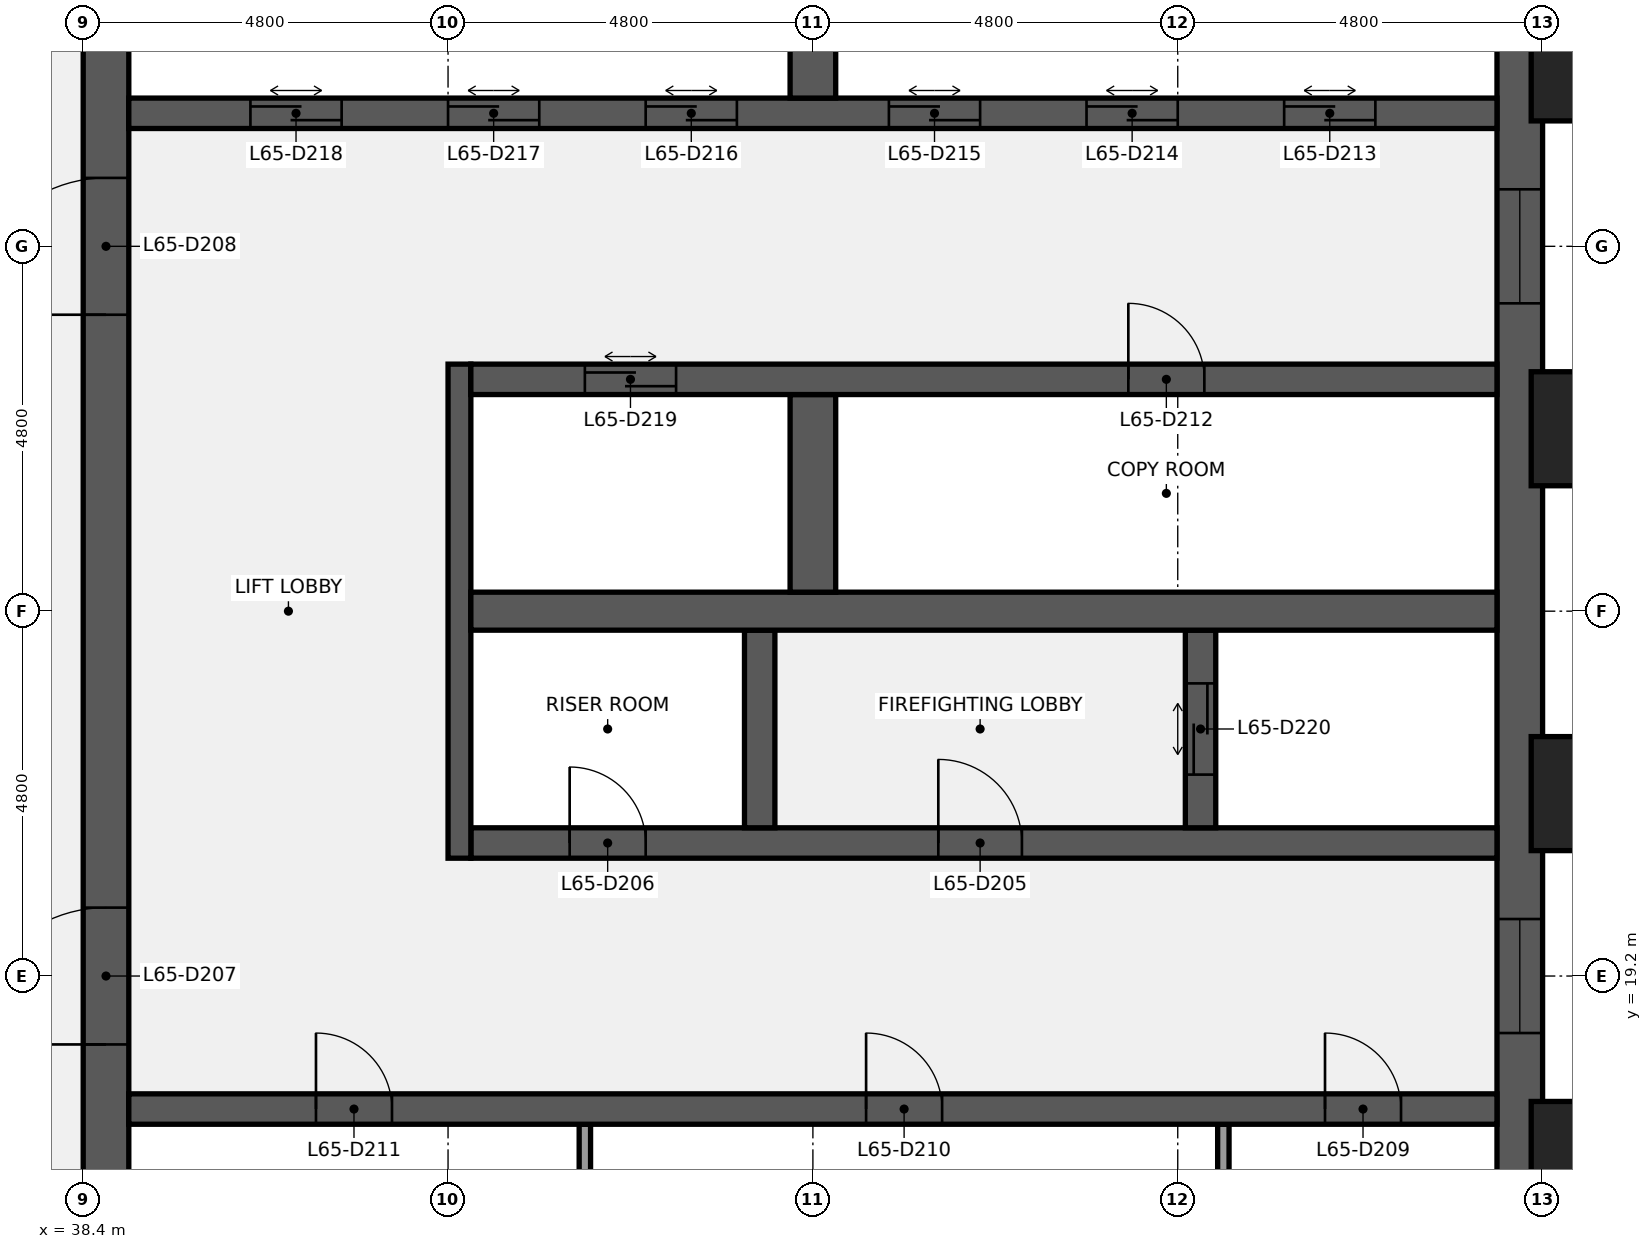
"""IFC4 building model, lengths in metres.
Left out: names, types, materials, properties, quantities, classifications, styles, units other than length and angle.
Written with IfcOpenShell. Run it as: python <this file> out.ifc"""

import sys

from ifc_helpers import new_model, si_unit, direction, frame, frame_2d, origin, origin_2d, place, context, subcontext, project, spatial, rectangle, extrude, element, fill, save


model = new_model("IFC4")
c1 = context("Model", 3, precision=1e-05, world=origin(), true_north=direction((0.0, 1.0)))
c2 = subcontext(c1, "Body", "Model", "MODEL_VIEW")
j1 = project(units=[si_unit("LENGTHUNIT", "METRE"), si_unit("PLANEANGLEUNIT", "RADIAN")], contexts=[c1])
p1 = place(None, origin())
s1 = spatial("IfcSite", under=j1, at=p1, CompositionType="ELEMENT")
p2 = place(p1, origin())
s2 = spatial("IfcBuilding", under=s1, at=p2, CompositionType="ELEMENT")
p3 = place(p2, frame((0.0, 0.0, 298.3)))
s3 = spatial("IfcBuildingStorey", under=s2, at=p3, CompositionType="ELEMENT", Elevation=298.3)
p4 = place(p3, frame((57.3, 38.4, 0.0), z_axis=(0.0, 0.0, 1.0), x_axis=(0.0, -1.0, 0.0)))
e1 = element("IfcWall", 1, at=p4, inside=s3, PredefinedType="SHEAR", context=c2, shape_type="SweptSolid", body=[
    extrude(rectangle(XDim=28.8, YDim=0.6, at=frame_2d((14.4, 0.0))), origin(), (0.0, 0.0, 1.0), 3.84),
])
p5 = place(p4, frame((18.45, 0.0, 0.9)))
e2 = element("IfcOpeningElement", 2, at=p5, cuts=e1, PredefinedType="OPENING", context=c2, shape_type="SweptSolid", body=[
    extrude(rectangle(XDim=1.5, YDim=1.5, at=frame_2d((0.75, 0.75))), frame((0.0, 0.31, 0.0), z_axis=(0.0, -1.0, 0.0), x_axis=(1.0, 0.0, 0.0)), (0.0, 0.0, 1.0), 0.62),
])
p6 = place(p4, frame((8.85, 0.0, 0.9)))
e3 = element("IfcOpeningElement", 3, at=p6, cuts=e1, PredefinedType="OPENING", context=c2, shape_type="SweptSolid", body=[
    extrude(rectangle(XDim=1.5, YDim=1.5, at=frame_2d((0.75, 0.75))), frame((0.0, 0.31, 0.0), z_axis=(0.0, -1.0, 0.0), x_axis=(1.0, 0.0, 0.0)), (0.0, 0.0, 1.0), 0.62),
])
p7 = place(p3, frame((38.7, 9.6, 0.0), z_axis=(0.0, 0.0, 1.0), x_axis=(0.0, 1.0, 0.0)))
e4 = element("IfcWall", 4, at=p7, inside=s3, PredefinedType="SHEAR", context=c2, shape_type="SweptSolid", body=[
    extrude(rectangle(XDim=28.8, YDim=0.6, at=frame_2d((14.4, 0.0))), origin(), (0.0, 0.0, 1.0), 3.84),
])
p8 = place(p7, frame((8.7, 0.0, 0.0)))
e5 = element("IfcOpeningElement", 5, at=p8, cuts=e4, PredefinedType="OPENING", context=c2, shape_type="SweptSolid", body=[
    extrude(rectangle(XDim=1.8, YDim=2.1, at=frame_2d((0.9, 1.05))), frame((0.0, 0.31, 0.0), z_axis=(0.0, -1.0, 0.0), x_axis=(1.0, 0.0, 0.0)), (0.0, 0.0, 1.0), 0.62),
])
p9 = place(p7, frame((18.3, 0.0, 0.0)))
e6 = element("IfcOpeningElement", 6, at=p9, cuts=e4, PredefinedType="OPENING", context=c2, shape_type="SweptSolid", body=[
    extrude(rectangle(XDim=1.8, YDim=2.1, at=frame_2d((0.9, 1.05))), frame((0.0, 0.31, 0.0), z_axis=(0.0, -1.0, 0.0), x_axis=(1.0, 0.0, 0.0)), (0.0, 0.0, 1.0), 0.62),
])
for number, where, z_axis, x_axis in (
    (7, (53.4, 14.65, 0.0), (0.0, 0.0, 1.0), (0.0, 1.0, 0.0)),
    (8, (45.0, 14.65, 0.0), (0.0, 0.0, 1.0), (0.0, 1.0, 0.0)),
):
    element("IfcWall", number, at=place(p3, frame(where, z_axis=z_axis, x_axis=x_axis)), inside=s3, PredefinedType="PARTITIONING", context=c2, shape_type="SweptSolid", body=[
        extrude(rectangle(XDim=2.6, YDim=0.15, at=frame_2d((1.3, 0.0))), origin(), (0.0, 0.0, 1.0), 3.84),
    ])
p10 = place(p3, frame((39.0, 17.45, 0.0), z_axis=(0.0, 0.0, 1.0), x_axis=(1.0, 0.0, 0.0)))
e9 = element("IfcWall", 9, at=p10, inside=s3, PredefinedType="SHEAR", context=c2, shape_type="SweptSolid", body=[
    extrude(rectangle(XDim=18.0, YDim=0.4, at=frame_2d((9.0, 0.0))), origin(), (0.0, 0.0, 1.0), 3.84),
])
p11 = place(p10, frame((15.738, 0.0, 0.0)))
e10 = element("IfcOpeningElement", 10, at=p11, cuts=e9, PredefinedType="OPENING", context=c2, shape_type="SweptSolid", body=[
    extrude(rectangle(XDim=1.0, YDim=2.1, at=frame_2d((0.5, 1.05))), frame((0.0, 0.21, 0.0), z_axis=(0.0, -1.0, 0.0), x_axis=(1.0, 0.0, 0.0)), (0.0, 0.0, 1.0), 0.42),
])
p12 = place(p10, frame((9.7, 0.0, 0.0)))
e11 = element("IfcOpeningElement", 11, at=p12, cuts=e9, PredefinedType="OPENING", context=c2, shape_type="SweptSolid", body=[
    extrude(rectangle(XDim=1.0, YDim=2.1, at=frame_2d((0.5, 1.05))), frame((0.0, 0.21, 0.0), z_axis=(0.0, -1.0, 0.0), x_axis=(1.0, 0.0, 0.0)), (0.0, 0.0, 1.0), 0.42),
])
p13 = place(p10, frame((2.462, 0.0, 0.0)))
e12 = element("IfcOpeningElement", 12, at=p13, cuts=e9, PredefinedType="OPENING", context=c2, shape_type="SweptSolid", body=[
    extrude(rectangle(XDim=1.0, YDim=2.1, at=frame_2d((0.5, 1.05))), frame((0.0, 0.21, 0.0), z_axis=(0.0, -1.0, 0.0), x_axis=(1.0, 0.0, 0.0)), (0.0, 0.0, 1.0), 0.42),
])
p14 = place(p3, frame((43.5, 20.95, 0.0), z_axis=(0.0, 0.0, 1.0), x_axis=(1.0, 0.0, 0.0)))
e13 = element("IfcWall", 13, at=p14, inside=s3, PredefinedType="SHEAR", context=c2, shape_type="SweptSolid", body=[
    extrude(rectangle(XDim=13.5, YDim=0.4, at=frame_2d((6.75, 0.0))), origin(), (0.0, 0.0, 1.0), 3.84),
])
p15 = place(p14, frame((6.15, 0.0, 0.0)))
e14 = element("IfcOpeningElement", 14, at=p15, cuts=e13, PredefinedType="OPENING", context=c2, shape_type="SweptSolid", body=[
    extrude(rectangle(XDim=1.1, YDim=2.1, at=frame_2d((0.55, 1.05))), frame((0.0, 0.21, 0.0), z_axis=(0.0, -1.0, 0.0), x_axis=(1.0, 0.0, 0.0)), (0.0, 0.0, 1.0), 0.42),
])
p16 = place(p14, frame((1.3, 0.0, 0.0)))
e15 = element("IfcOpeningElement", 15, at=p16, cuts=e13, PredefinedType="OPENING", context=c2, shape_type="SweptSolid", body=[
    extrude(rectangle(XDim=1.0, YDim=2.1, at=frame_2d((0.5, 1.05))), frame((0.0, 0.21, 0.0), z_axis=(0.0, -1.0, 0.0), x_axis=(1.0, 0.0, 0.0)), (0.0, 0.0, 1.0), 0.42),
])
p17 = place(p3, frame((43.35, 20.75, 0.0), z_axis=(0.0, 0.0, 1.0), x_axis=(0.0, 1.0, 0.0)))
e16 = element("IfcWall", 16, at=p17, inside=s3, PredefinedType="SHEAR", context=c2, shape_type="SweptSolid", body=[
    extrude(rectangle(XDim=6.5, YDim=0.3, at=frame_2d((3.25, 0.0))), origin(), (0.0, 0.0, 1.0), 3.84),
])
p18 = place(p3, frame((53.1, 21.15, 0.0), z_axis=(0.0, 0.0, 1.0), x_axis=(0.0, 1.0, 0.0)))
e17 = element("IfcWall", 17, at=p18, inside=s3, PredefinedType="SHEAR", context=c2, shape_type="SweptSolid", body=[
    extrude(rectangle(XDim=2.6, YDim=0.4, at=frame_2d((1.3, 0.0))), origin(), (0.0, 0.0, 1.0), 3.84),
])
p19 = place(p18, frame((0.7, 0.0, 0.0)))
e18 = element("IfcOpeningElement", 18, at=p19, cuts=e17, PredefinedType="OPENING", context=c2, shape_type="SweptSolid", body=[
    extrude(rectangle(XDim=1.2, YDim=2.1, at=frame_2d((0.6, 1.05))), frame((0.0, 0.21, 0.0), z_axis=(0.0, -1.0, 0.0), x_axis=(1.0, 0.0, 0.0)), (0.0, 0.0, 1.0), 0.42),
])
p20 = place(p3, frame((47.3, 21.15, 0.0), z_axis=(0.0, 0.0, 1.0), x_axis=(0.0, 1.0, 0.0)))
e19 = element("IfcWall", 19, at=p20, inside=s3, PredefinedType="SHEAR", context=c2, shape_type="SweptSolid", body=[
    extrude(rectangle(XDim=2.6, YDim=0.4, at=frame_2d((1.3, 0.0))), origin(), (0.0, 0.0, 1.0), 3.84),
])
p21 = place(p3, frame((43.5, 24.0, 0.0), z_axis=(0.0, 0.0, 1.0), x_axis=(1.0, 0.0, 0.0)))
e20 = element("IfcWall", 20, at=p21, inside=s3, PredefinedType="SHEAR", context=c2, shape_type="SweptSolid", body=[
    extrude(rectangle(XDim=13.5, YDim=0.5, at=frame_2d((6.75, 0.0))), origin(), (0.0, 0.0, 1.0), 3.84),
])
p22 = place(p3, frame((48.0, 24.25, 0.0), z_axis=(0.0, 0.0, 1.0), x_axis=(0.0, 1.0, 0.0)))
e21 = element("IfcWall", 21, at=p22, inside=s3, PredefinedType="SHEAR", context=c2, shape_type="SweptSolid", body=[
    extrude(rectangle(XDim=2.6, YDim=0.6, at=frame_2d((1.3, 0.0))), origin(), (0.0, 0.0, 1.0), 3.84),
])
p23 = place(p3, frame((43.5, 27.05, 0.0), z_axis=(0.0, 0.0, 1.0), x_axis=(1.0, 0.0, 0.0)))
e22 = element("IfcWall", 22, at=p23, inside=s3, PredefinedType="SHEAR", context=c2, shape_type="SweptSolid", body=[
    extrude(rectangle(XDim=13.5, YDim=0.4, at=frame_2d((6.75, 0.0))), origin(), (0.0, 0.0, 1.0), 3.84),
])
p24 = place(p23, frame((8.65, 0.0, 0.0)))
e23 = element("IfcOpeningElement", 23, at=p24, cuts=e22, PredefinedType="OPENING", context=c2, shape_type="SweptSolid", body=[
    extrude(rectangle(XDim=1.0, YDim=2.1, at=frame_2d((0.5, 1.05))), frame((0.0, 0.21, 0.0), z_axis=(0.0, -1.0, 0.0), x_axis=(1.0, 0.0, 0.0)), (0.0, 0.0, 1.0), 0.42),
])
p25 = place(p23, frame((1.5, 0.0, 0.0)))
e24 = element("IfcOpeningElement", 24, at=p25, cuts=e22, PredefinedType="OPENING", context=c2, shape_type="SweptSolid", body=[
    extrude(rectangle(XDim=1.2, YDim=2.1, at=frame_2d((0.6, 1.05))), frame((0.0, 0.21, 0.0), z_axis=(0.0, -1.0, 0.0), x_axis=(1.0, 0.0, 0.0)), (0.0, 0.0, 1.0), 0.42),
])
p26 = place(p3, frame((39.0, 30.55, 0.0), z_axis=(0.0, 0.0, 1.0), x_axis=(1.0, 0.0, 0.0)))
e25 = element("IfcWall", 25, at=p26, inside=s3, PredefinedType="SHEAR", context=c2, shape_type="SweptSolid", body=[
    extrude(rectangle(XDim=18.0, YDim=0.4, at=frame_2d((9.0, 0.0))), origin(), (0.0, 0.0, 1.0), 3.84),
])
p27 = place(p26, frame((15.2, 0.0, 0.0)))
e26 = element("IfcOpeningElement", 26, at=p27, cuts=e25, PredefinedType="OPENING", context=c2, shape_type="SweptSolid", body=[
    extrude(rectangle(XDim=1.2, YDim=2.1, at=frame_2d((0.6, 1.05))), frame((0.0, 0.21, 0.0), z_axis=(0.0, -1.0, 0.0), x_axis=(1.0, 0.0, 0.0)), (0.0, 0.0, 1.0), 0.42),
])
p28 = place(p26, frame((12.6, 0.0, 0.0)))
e27 = element("IfcOpeningElement", 27, at=p28, cuts=e25, PredefinedType="OPENING", context=c2, shape_type="SweptSolid", body=[
    extrude(rectangle(XDim=1.2, YDim=2.1, at=frame_2d((0.6, 1.05))), frame((0.0, 0.21, 0.0), z_axis=(0.0, -1.0, 0.0), x_axis=(1.0, 0.0, 0.0)), (0.0, 0.0, 1.0), 0.42),
])
p29 = place(p26, frame((10.0, 0.0, 0.0)))
e28 = element("IfcOpeningElement", 28, at=p29, cuts=e25, PredefinedType="OPENING", context=c2, shape_type="SweptSolid", body=[
    extrude(rectangle(XDim=1.2, YDim=2.1, at=frame_2d((0.6, 1.05))), frame((0.0, 0.21, 0.0), z_axis=(0.0, -1.0, 0.0), x_axis=(1.0, 0.0, 0.0)), (0.0, 0.0, 1.0), 0.42),
])
p30 = place(p26, frame((6.8, 0.0, 0.0)))
e29 = element("IfcOpeningElement", 29, at=p30, cuts=e25, PredefinedType="OPENING", context=c2, shape_type="SweptSolid", body=[
    extrude(rectangle(XDim=1.2, YDim=2.1, at=frame_2d((0.6, 1.05))), frame((0.0, 0.21, 0.0), z_axis=(0.0, -1.0, 0.0), x_axis=(1.0, 0.0, 0.0)), (0.0, 0.0, 1.0), 0.42),
])
p31 = place(p26, frame((4.2, 0.0, 0.0)))
e30 = element("IfcOpeningElement", 30, at=p31, cuts=e25, PredefinedType="OPENING", context=c2, shape_type="SweptSolid", body=[
    extrude(rectangle(XDim=1.2, YDim=2.1, at=frame_2d((0.6, 1.05))), frame((0.0, 0.21, 0.0), z_axis=(0.0, -1.0, 0.0), x_axis=(1.0, 0.0, 0.0)), (0.0, 0.0, 1.0), 0.42),
])
p32 = place(p26, frame((1.6, 0.0, 0.0)))
e31 = element("IfcOpeningElement", 31, at=p32, cuts=e25, PredefinedType="OPENING", context=c2, shape_type="SweptSolid", body=[
    extrude(rectangle(XDim=1.2, YDim=2.1, at=frame_2d((0.6, 1.05))), frame((0.0, 0.21, 0.0), z_axis=(0.0, -1.0, 0.0), x_axis=(1.0, 0.0, 0.0)), (0.0, 0.0, 1.0), 0.42),
])
p33 = place(p3, frame((48.0, 30.75, 0.0), z_axis=(0.0, 0.0, 1.0), x_axis=(0.0, 1.0, 0.0)))
e32 = element("IfcWall", 32, at=p33, inside=s3, PredefinedType="SHEAR", context=c2, shape_type="SweptSolid", body=[
    extrude(rectangle(XDim=2.6, YDim=0.6, at=frame_2d((1.3, 0.0))), origin(), (0.0, 0.0, 1.0), 3.84),
])
for number, where, z_axis, x_axis in (
    (33, (58.35, 16.8, 0.0), (0.0, 0.0, 1.0), (0.0, 1.0, 0.0)),
    (34, (58.35, 21.6, 0.0), (0.0, 0.0, 1.0), (0.0, 1.0, 0.0)),
    (35, (58.35, 26.4, 0.0), (0.0, 0.0, 1.0), (0.0, 1.0, 0.0)),
    (36, (58.35, 31.2, 0.0), (0.0, 0.0, 1.0), (0.0, 1.0, 0.0)),
):
    element("IfcColumn", number, at=place(p3, frame(where, z_axis=z_axis, x_axis=x_axis)), inside=s3, PredefinedType="PILASTER", context=c2, shape_type="SweptSolid", body=[
        extrude(rectangle(XDim=1.8, YDim=1.5, at=origin_2d()), origin(), (0.0, 0.0, 1.0), 4.0),
    ])
p34 = place(p15, origin())
e37 = element("IfcDoor", 37, at=p34, inside=s3, OperationType="SINGLE_SWING_LEFT", PredefinedType="DOOR", context=c2, shape_type="SweptSolid", body=[
    extrude(rectangle(XDim=1.1, YDim=2.1, at=frame_2d((0.55, 1.05))), frame((0.0, 0.025, 0.0), z_axis=(0.0, -1.0, 0.0), x_axis=(1.0, 0.0, 0.0)), (0.0, 0.0, 1.0), 0.05),
])
fill(e14, e37)
p35 = place(p16, origin())
e38 = element("IfcDoor", 38, at=p35, inside=s3, OperationType="SINGLE_SWING_LEFT", PredefinedType="DOOR", context=c2, shape_type="SweptSolid", body=[
    extrude(rectangle(XDim=1.0, YDim=2.1, at=frame_2d((0.5, 1.05))), frame((0.0, 0.025, 0.0), z_axis=(0.0, -1.0, 0.0), x_axis=(1.0, 0.0, 0.0)), (0.0, 0.0, 1.0), 0.05),
])
fill(e15, e38)
p36 = place(p8, origin())
e39 = element("IfcDoor", 39, at=p36, inside=s3, OperationType="DOUBLE_DOOR_SINGLE_SWING", PredefinedType="DOOR", context=c2, shape_type="SweptSolid", body=[
    extrude(rectangle(XDim=1.8, YDim=2.1, at=frame_2d((0.9, 1.05))), frame((0.0, 0.025, 0.0), z_axis=(0.0, -1.0, 0.0), x_axis=(1.0, 0.0, 0.0)), (0.0, 0.0, 1.0), 0.05),
])
fill(e5, e39)
p37 = place(p9, origin())
e40 = element("IfcDoor", 40, at=p37, inside=s3, OperationType="DOUBLE_DOOR_SINGLE_SWING", PredefinedType="DOOR", context=c2, shape_type="SweptSolid", body=[
    extrude(rectangle(XDim=1.8, YDim=2.1, at=frame_2d((0.9, 1.05))), frame((0.0, 0.025, 0.0), z_axis=(0.0, -1.0, 0.0), x_axis=(1.0, 0.0, 0.0)), (0.0, 0.0, 1.0), 0.05),
])
fill(e6, e40)
p38 = place(p11, origin())
e41 = element("IfcDoor", 41, at=p38, inside=s3, OperationType="SINGLE_SWING_LEFT", PredefinedType="DOOR", context=c2, shape_type="SweptSolid", body=[
    extrude(rectangle(XDim=1.0, YDim=2.1, at=frame_2d((0.5, 1.05))), frame((0.0, 0.025, 0.0), z_axis=(0.0, -1.0, 0.0), x_axis=(1.0, 0.0, 0.0)), (0.0, 0.0, 1.0), 0.05),
])
fill(e10, e41)
p39 = place(p12, origin())
e42 = element("IfcDoor", 42, at=p39, inside=s3, OperationType="SINGLE_SWING_LEFT", PredefinedType="DOOR", context=c2, shape_type="SweptSolid", body=[
    extrude(rectangle(XDim=1.0, YDim=2.1, at=frame_2d((0.5, 1.05))), frame((0.0, 0.025, 0.0), z_axis=(0.0, -1.0, 0.0), x_axis=(1.0, 0.0, 0.0)), (0.0, 0.0, 1.0), 0.05),
])
fill(e11, e42)
p40 = place(p13, origin())
e43 = element("IfcDoor", 43, at=p40, inside=s3, OperationType="SINGLE_SWING_LEFT", PredefinedType="DOOR", context=c2, shape_type="SweptSolid", body=[
    extrude(rectangle(XDim=1.0, YDim=2.1, at=frame_2d((0.5, 1.05))), frame((0.0, 0.025, 0.0), z_axis=(0.0, -1.0, 0.0), x_axis=(1.0, 0.0, 0.0)), (0.0, 0.0, 1.0), 0.05),
])
fill(e12, e43)
p41 = place(p24, origin())
e44 = element("IfcDoor", 44, at=p41, inside=s3, OperationType="SINGLE_SWING_LEFT", PredefinedType="DOOR", context=c2, shape_type="SweptSolid", body=[
    extrude(rectangle(XDim=1.0, YDim=2.1, at=frame_2d((0.5, 1.05))), frame((0.0, 0.025, 0.0), z_axis=(0.0, -1.0, 0.0), x_axis=(1.0, 0.0, 0.0)), (0.0, 0.0, 1.0), 0.05),
])
fill(e23, e44)
p42 = place(p27, origin())
e45 = element("IfcDoor", 45, at=p42, inside=s3, OperationType="DOUBLE_DOOR_SLIDING", PredefinedType="DOOR", context=c2, shape_type="SweptSolid", body=[
    extrude(rectangle(XDim=1.2, YDim=2.1, at=frame_2d((0.6, 1.05))), frame((0.0, 0.025, 0.0), z_axis=(0.0, -1.0, 0.0), x_axis=(1.0, 0.0, 0.0)), (0.0, 0.0, 1.0), 0.05),
])
fill(e26, e45)
p43 = place(p28, origin())
e46 = element("IfcDoor", 46, at=p43, inside=s3, OperationType="DOUBLE_DOOR_SLIDING", PredefinedType="DOOR", context=c2, shape_type="SweptSolid", body=[
    extrude(rectangle(XDim=1.2, YDim=2.1, at=frame_2d((0.6, 1.05))), frame((0.0, 0.025, 0.0), z_axis=(0.0, -1.0, 0.0), x_axis=(1.0, 0.0, 0.0)), (0.0, 0.0, 1.0), 0.05),
])
fill(e27, e46)
p44 = place(p29, origin())
e47 = element("IfcDoor", 47, at=p44, inside=s3, OperationType="DOUBLE_DOOR_SLIDING", PredefinedType="DOOR", context=c2, shape_type="SweptSolid", body=[
    extrude(rectangle(XDim=1.2, YDim=2.1, at=frame_2d((0.6, 1.05))), frame((0.0, 0.025, 0.0), z_axis=(0.0, -1.0, 0.0), x_axis=(1.0, 0.0, 0.0)), (0.0, 0.0, 1.0), 0.05),
])
fill(e28, e47)
p45 = place(p30, origin())
e48 = element("IfcDoor", 48, at=p45, inside=s3, OperationType="DOUBLE_DOOR_SLIDING", PredefinedType="DOOR", context=c2, shape_type="SweptSolid", body=[
    extrude(rectangle(XDim=1.2, YDim=2.1, at=frame_2d((0.6, 1.05))), frame((0.0, 0.025, 0.0), z_axis=(0.0, -1.0, 0.0), x_axis=(1.0, 0.0, 0.0)), (0.0, 0.0, 1.0), 0.05),
])
fill(e29, e48)
p46 = place(p31, origin())
e49 = element("IfcDoor", 49, at=p46, inside=s3, OperationType="DOUBLE_DOOR_SLIDING", PredefinedType="DOOR", context=c2, shape_type="SweptSolid", body=[
    extrude(rectangle(XDim=1.2, YDim=2.1, at=frame_2d((0.6, 1.05))), frame((0.0, 0.025, 0.0), z_axis=(0.0, -1.0, 0.0), x_axis=(1.0, 0.0, 0.0)), (0.0, 0.0, 1.0), 0.05),
])
fill(e30, e49)
p47 = place(p32, origin())
e50 = element("IfcDoor", 50, at=p47, inside=s3, OperationType="DOUBLE_DOOR_SLIDING", PredefinedType="DOOR", context=c2, shape_type="SweptSolid", body=[
    extrude(rectangle(XDim=1.2, YDim=2.1, at=frame_2d((0.6, 1.05))), frame((0.0, 0.025, 0.0), z_axis=(0.0, -1.0, 0.0), x_axis=(1.0, 0.0, 0.0)), (0.0, 0.0, 1.0), 0.05),
])
fill(e31, e50)
p48 = place(p25, origin())
e51 = element("IfcDoor", 51, at=p48, inside=s3, OperationType="DOUBLE_DOOR_SLIDING", PredefinedType="DOOR", context=c2, shape_type="SweptSolid", body=[
    extrude(rectangle(XDim=1.2, YDim=2.1, at=frame_2d((0.6, 1.05))), frame((0.0, 0.025, 0.0), z_axis=(0.0, -1.0, 0.0), x_axis=(1.0, 0.0, 0.0)), (0.0, 0.0, 1.0), 0.05),
])
fill(e24, e51)
p49 = place(p19, origin())
e52 = element("IfcDoor", 52, at=p49, inside=s3, OperationType="DOUBLE_DOOR_SLIDING", PredefinedType="DOOR", context=c2, shape_type="SweptSolid", body=[
    extrude(rectangle(XDim=1.2, YDim=2.1, at=frame_2d((0.6, 1.05))), frame((0.0, 0.025, 0.0), z_axis=(0.0, -1.0, 0.0), x_axis=(1.0, 0.0, 0.0)), (0.0, 0.0, 1.0), 0.05),
])
fill(e18, e52)
p50 = place(p5, origin())
e53 = element("IfcWindow", 53, at=p50, inside=s3, PartitioningType="SINGLE_PANEL", PredefinedType="WINDOW", context=c2, shape_type="SweptSolid", body=[
    extrude(rectangle(XDim=1.5, YDim=1.5, at=frame_2d((0.75, 0.75))), frame((0.0, 0.03, 0.0), z_axis=(0.0, -1.0, 0.0), x_axis=(1.0, 0.0, 0.0)), (0.0, 0.0, 1.0), 0.06),
])
fill(e2, e53)
p51 = place(p6, origin())
e54 = element("IfcWindow", 54, at=p51, inside=s3, PartitioningType="SINGLE_PANEL", PredefinedType="WINDOW", context=c2, shape_type="SweptSolid", body=[
    extrude(rectangle(XDim=1.5, YDim=1.5, at=frame_2d((0.75, 0.75))), frame((0.0, 0.03, 0.0), z_axis=(0.0, -1.0, 0.0), x_axis=(1.0, 0.0, 0.0)), (0.0, 0.0, 1.0), 0.06),
])
fill(e3, e54)
save(model, sys.argv[1])
